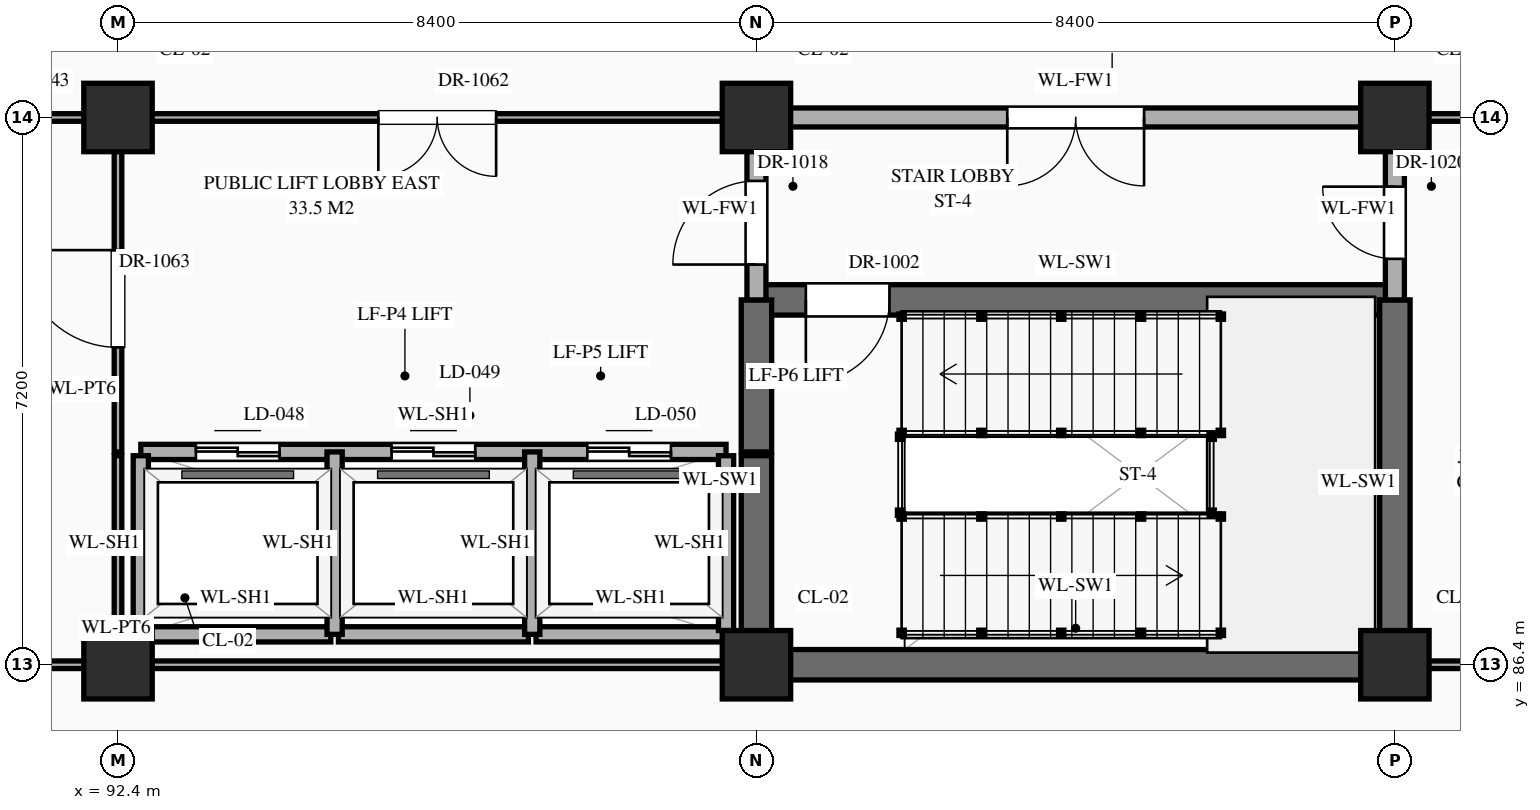
"""IFC4 building model, lengths in metres.
Left out: names, types, materials, properties, quantities, classifications, styles, units other than length and angle.
Written with IfcOpenShell. Run it as: python <this file> out.ifc"""

import sys

from ifc_helpers import new_model, si_unit, direction, frame, frame_2d, origin, origin_2d, place, context, subcontext, project, spatial, rectangle, extrude, element, fill, save


model = new_model("IFC4")
c1 = context("Model", 3, precision=1e-05, world=origin(), true_north=direction((0.0, 1.0)))
c2 = subcontext(c1, "Body", "Model", "MODEL_VIEW")
j1 = project(units=[si_unit("LENGTHUNIT", "METRE"), si_unit("PLANEANGLEUNIT", "RADIAN")], contexts=[c1])
p1 = place(None, origin())
s1 = spatial("IfcSite", under=j1, at=p1, CompositionType="ELEMENT")
p2 = place(p1, origin())
s2 = spatial("IfcBuilding", under=s1, at=p2, CompositionType="ELEMENT")
p3 = place(p2, frame((0.0, 0.0, 5.4)))
s3 = spatial("IfcBuildingStorey", under=s2, at=p3, CompositionType="ELEMENT", Elevation=5.4)
for number, where, z_axis, x_axis in (
    (1, (92.4, 86.4, 0.0), (0.0, 0.0, 1.0), (1.0, 0.0, 0.0)),
    (2, (92.4, 93.6, 0.0), (0.0, 0.0, 1.0), (1.0, 0.0, 0.0)),
    (3, (100.8, 86.4, 0.0), (0.0, 0.0, 1.0), (1.0, 0.0, 0.0)),
    (4, (100.8, 93.6, 0.0), (0.0, 0.0, 1.0), (1.0, 0.0, 0.0)),
    (5, (109.2, 86.4, 0.0), (0.0, 0.0, 1.0), (1.0, 0.0, 0.0)),
    (6, (109.2, 93.6, 0.0), (0.0, 0.0, 1.0), (1.0, 0.0, 0.0)),
):
    element("IfcColumn", number, at=place(p3, frame(where, z_axis=z_axis, x_axis=x_axis)), inside=s3, PredefinedType="COLUMN", context=c2, shape_type="SweptSolid", body=[
        extrude(rectangle(XDim=0.9, YDim=0.9, at=origin_2d()), origin(), (0.0, 0.0, 1.0), 5.4),
    ])
p4 = place(p3, frame((84.0, 86.4, 0.0), z_axis=(0.0, 0.0, 1.0), x_axis=(1.0, 0.0, 0.0)))
e7 = element("IfcWall", 7, at=p4, inside=s3, PredefinedType="STANDARD", context=c2, shape_type="SweptSolid", body=[
    extrude(rectangle(XDim=8.4, YDim=0.1, at=frame_2d((4.2, 0.0))), origin(), (0.0, 0.0, 1.0), 4.27),
])
p5 = place(p4, frame((1.025, 0.0, 0.0)))
e8 = element("IfcOpeningElement", 8, at=p5, cuts=e7, PredefinedType="OPENING", context=c2, shape_type="SweptSolid", body=[
    extrude(rectangle(XDim=1.12, YDim=2.25, at=frame_2d((0.56, 1.125))), frame((0.0, 0.062, 0.0), z_axis=(0.0, -1.0, 0.0), x_axis=(1.0, 0.0, 0.0)), (0.0, 0.0, 1.0), 0.124),
])
p6 = place(p4, frame((3.6, 0.0, 0.0)))
e9 = element("IfcOpeningElement", 9, at=p6, cuts=e7, PredefinedType="OPENING", context=c2, shape_type="SweptSolid", body=[
    extrude(rectangle(XDim=1.2, YDim=2.35, at=frame_2d((0.6, 1.175))), frame((0.0, 0.062, 0.0), z_axis=(0.0, -1.0, 0.0), x_axis=(1.0, 0.0, 0.0)), (0.0, 0.0, 1.0), 0.124),
])
p7 = place(p4, frame((6.195, 0.0, 0.0)))
e10 = element("IfcOpeningElement", 10, at=p7, cuts=e7, PredefinedType="OPENING", context=c2, shape_type="SweptSolid", body=[
    extrude(rectangle(XDim=1.24, YDim=2.3, at=frame_2d((0.62, 1.15))), frame((0.0, 0.062, 0.0), z_axis=(0.0, -1.0, 0.0), x_axis=(1.0, 0.0, 0.0)), (0.0, 0.0, 1.0), 0.124),
])
p8 = place(p3, frame((92.45, 86.4, 0.0), z_axis=(0.0, 0.0, 1.0), x_axis=(1.0, 0.0, 0.0)))
e11 = element("IfcWall", 11, at=p8, inside=s3, PredefinedType="STANDARD", context=c2, shape_type="SweptSolid", body=[
    extrude(rectangle(XDim=8.3, YDim=0.1, at=frame_2d((4.15, 0.0))), origin(), (0.0, 0.0, 1.0), 4.27),
])
p9 = place(p3, frame((100.8, 86.4, 0.0), z_axis=(0.0, 0.0, 1.0), x_axis=(1.0, 0.0, 0.0)))
e12 = element("IfcWall", 12, at=p9, inside=s3, PredefinedType="SHEAR", context=c2, shape_type="SweptSolid", body=[
    extrude(rectangle(XDim=8.4, YDim=0.4, at=frame_2d((4.2, 0.0))), origin(), (0.0, 0.0, 1.0), 5.12),
])
p10 = place(p3, frame((109.2, 86.4, 0.0), z_axis=(0.0, 0.0, 1.0), x_axis=(1.0, 0.0, 0.0)))
e13 = element("IfcWall", 13, at=p10, inside=s3, PredefinedType="STANDARD", context=c2, shape_type="SweptSolid", body=[
    extrude(rectangle(XDim=8.4, YDim=0.1, at=frame_2d((4.2, 0.0))), origin(), (0.0, 0.0, 1.0), 4.27),
])
p11 = place(p10, frame((1.115, 0.0, 0.0)))
e14 = element("IfcOpeningElement", 14, at=p11, cuts=e13, PredefinedType="OPENING", context=c2, shape_type="SweptSolid", body=[
    extrude(rectangle(XDim=0.94, YDim=2.3, at=frame_2d((0.47, 1.15))), frame((0.0, 0.062, 0.0), z_axis=(0.0, -1.0, 0.0), x_axis=(1.0, 0.0, 0.0)), (0.0, 0.0, 1.0), 0.124),
])
p12 = place(p10, frame((3.69, 0.0, 0.0)))
e15 = element("IfcOpeningElement", 15, at=p12, cuts=e13, PredefinedType="OPENING", context=c2, shape_type="SweptSolid", body=[
    extrude(rectangle(XDim=1.02, YDim=2.4, at=frame_2d((0.51, 1.2))), frame((0.0, 0.062, 0.0), z_axis=(0.0, -1.0, 0.0), x_axis=(1.0, 0.0, 0.0)), (0.0, 0.0, 1.0), 0.124),
])
p13 = place(p10, frame((6.285, 0.0, 0.0)))
e16 = element("IfcOpeningElement", 16, at=p13, cuts=e13, PredefinedType="OPENING", context=c2, shape_type="SweptSolid", body=[
    extrude(rectangle(XDim=1.06, YDim=2.4, at=frame_2d((0.53, 1.2))), frame((0.0, 0.062, 0.0), z_axis=(0.0, -1.0, 0.0), x_axis=(1.0, 0.0, 0.0)), (0.0, 0.0, 1.0), 0.124),
])
for number, where, z_axis, x_axis in (
    (17, (92.7, 86.8, 0.0), (0.0, 0.0, 1.0), (1.0, 0.0, 0.0)),
    (18, (95.3, 86.8, 0.0), (0.0, 0.0, 1.0), (1.0, 0.0, 0.0)),
    (19, (97.9, 86.8, 0.0), (0.0, 0.0, 1.0), (1.0, 0.0, 0.0)),
):
    element("IfcWall", number, at=place(p3, frame(where, z_axis=z_axis, x_axis=x_axis)), inside=s3, PredefinedType="STANDARD", context=c2, shape_type="SweptSolid", body=[
        extrude(rectangle(XDim=2.5, YDim=0.2, at=frame_2d((1.25, 0.0))), origin(), (0.0, 0.0, 1.0), 5.12),
    ])
p14 = place(p3, frame((92.7, 89.2, 0.0), z_axis=(0.0, 0.0, 1.0), x_axis=(1.0, 0.0, 0.0)))
e20 = element("IfcWall", 20, at=p14, inside=s3, PredefinedType="STANDARD", context=c2, shape_type="SweptSolid", body=[
    extrude(rectangle(XDim=7.7, YDim=0.2, at=frame_2d((3.85, 0.0))), origin(), (0.0, 0.0, 1.0), 5.12),
])
p15 = place(p14, frame((0.725, 0.0, 0.0)))
e21 = element("IfcOpeningElement", 21, at=p15, cuts=e20, PredefinedType="OPENING", context=c2, shape_type="SweptSolid", body=[
    extrude(rectangle(XDim=1.1, YDim=2.15, at=frame_2d((0.55, 1.075))), frame((0.0, 0.112, 0.0), z_axis=(0.0, -1.0, 0.0), x_axis=(1.0, 0.0, 0.0)), (0.0, 0.0, 1.0), 0.224),
])
p16 = place(p14, frame((3.3, 0.0, 0.0)))
e22 = element("IfcOpeningElement", 22, at=p16, cuts=e20, PredefinedType="OPENING", context=c2, shape_type="SweptSolid", body=[
    extrude(rectangle(XDim=1.1, YDim=2.15, at=frame_2d((0.55, 1.075))), frame((0.0, 0.112, 0.0), z_axis=(0.0, -1.0, 0.0), x_axis=(1.0, 0.0, 0.0)), (0.0, 0.0, 1.0), 0.224),
])
p17 = place(p14, frame((5.875, 0.0, 0.0)))
e23 = element("IfcOpeningElement", 23, at=p17, cuts=e20, PredefinedType="OPENING", context=c2, shape_type="SweptSolid", body=[
    extrude(rectangle(XDim=1.1, YDim=2.15, at=frame_2d((0.55, 1.075))), frame((0.0, 0.112, 0.0), z_axis=(0.0, -1.0, 0.0), x_axis=(1.0, 0.0, 0.0)), (0.0, 0.0, 1.0), 0.224),
])
p18 = place(p3, frame((100.8, 91.2, 0.0), z_axis=(0.0, 0.0, 1.0), x_axis=(1.0, 0.0, 0.0)))
e24 = element("IfcWall", 24, at=p18, inside=s3, PredefinedType="SHEAR", context=c2, shape_type="SweptSolid", body=[
    extrude(rectangle(XDim=8.4, YDim=0.4, at=frame_2d((4.2, 0.0))), origin(), (0.0, 0.0, 1.0), 5.12),
])
p19 = place(p18, frame((0.65, 0.0, 0.0)))
e25 = element("IfcOpeningElement", 25, at=p19, cuts=e24, PredefinedType="OPENING", context=c2, shape_type="SweptSolid", body=[
    extrude(rectangle(XDim=1.1, YDim=2.2, at=frame_2d((0.55, 1.1))), frame((0.0, 0.212, 0.0), z_axis=(0.0, -1.0, 0.0), x_axis=(1.0, 0.0, 0.0)), (0.0, 0.0, 1.0), 0.424),
])
p20 = place(p3, frame((67.2, 93.6, 0.0), z_axis=(0.0, 0.0, 1.0), x_axis=(1.0, 0.0, 0.0)))
e26 = element("IfcWall", 26, at=p20, inside=s3, PredefinedType="STANDARD", context=c2, shape_type="SweptSolid", body=[
    extrude(rectangle(XDim=33.6, YDim=0.1, at=frame_2d((16.8, 0.0))), origin(), (0.0, 0.0, 1.0), 4.27),
])
p21 = place(p20, frame((3.375, 0.0, 0.0)))
e27 = element("IfcOpeningElement", 27, at=p21, cuts=e26, PredefinedType="OPENING", context=c2, shape_type="SweptSolid", body=[
    extrude(rectangle(XDim=1.65, YDim=2.4, at=frame_2d((0.825, 1.2))), frame((0.0, 0.062, 0.0), z_axis=(0.0, -1.0, 0.0), x_axis=(1.0, 0.0, 0.0)), (0.0, 0.0, 1.0), 0.124),
])
p22 = place(p20, frame((28.625, 0.0, 0.0)))
e28 = element("IfcOpeningElement", 28, at=p22, cuts=e26, PredefinedType="OPENING", context=c2, shape_type="SweptSolid", body=[
    extrude(rectangle(XDim=1.55, YDim=2.35, at=frame_2d((0.775, 1.175))), frame((0.0, 0.062, 0.0), z_axis=(0.0, -1.0, 0.0), x_axis=(1.0, 0.0, 0.0)), (0.0, 0.0, 1.0), 0.124),
])
p23 = place(p20, frame((11.65, 0.0, 0.0)))
e29 = element("IfcOpeningElement", 29, at=p23, cuts=e26, PredefinedType="OPENING", context=c2, shape_type="SweptSolid", body=[
    extrude(rectangle(XDim=1.9, YDim=2.5, at=frame_2d((0.95, 1.25))), frame((0.0, 0.062, 0.0), z_axis=(0.0, -1.0, 0.0), x_axis=(1.0, 0.0, 0.0)), (0.0, 0.0, 1.0), 0.124),
])
p24 = place(p20, frame((17.885, 0.0, 0.0)))
e30 = element("IfcOpeningElement", 30, at=p24, cuts=e26, PredefinedType="OPENING", context=c2, shape_type="SweptSolid", body=[
    extrude(rectangle(XDim=1.0, YDim=2.25, at=frame_2d((0.5, 1.125))), frame((0.0, 0.062, 0.0), z_axis=(0.0, -1.0, 0.0), x_axis=(1.0, 0.0, 0.0)), (0.0, 0.0, 1.0), 0.124),
])
p25 = place(p20, frame((20.48, 0.0, 0.0)))
e31 = element("IfcOpeningElement", 31, at=p25, cuts=e26, PredefinedType="OPENING", context=c2, shape_type="SweptSolid", body=[
    extrude(rectangle(XDim=1.04, YDim=2.2, at=frame_2d((0.52, 1.1))), frame((0.0, 0.062, 0.0), z_axis=(0.0, -1.0, 0.0), x_axis=(1.0, 0.0, 0.0)), (0.0, 0.0, 1.0), 0.124),
])
p26 = place(p20, frame((23.075, 0.0, 0.0)))
e32 = element("IfcOpeningElement", 32, at=p26, cuts=e26, PredefinedType="OPENING", context=c2, shape_type="SweptSolid", body=[
    extrude(rectangle(XDim=1.08, YDim=2.25, at=frame_2d((0.54, 1.125))), frame((0.0, 0.062, 0.0), z_axis=(0.0, -1.0, 0.0), x_axis=(1.0, 0.0, 0.0)), (0.0, 0.0, 1.0), 0.124),
])
p27 = place(p3, frame((100.8, 93.6, 0.0), z_axis=(0.0, 0.0, 1.0), x_axis=(1.0, 0.0, 0.0)))
e33 = element("IfcWall", 33, at=p27, inside=s3, PredefinedType="STANDARD", context=c2, shape_type="SweptSolid", body=[
    extrude(rectangle(XDim=8.4, YDim=0.25, at=frame_2d((4.2, 0.0))), origin(), (0.0, 0.0, 1.0), 4.27),
])
p28 = place(p27, frame((3.3, 0.0, 0.0)))
e34 = element("IfcOpeningElement", 34, at=p28, cuts=e33, PredefinedType="OPENING", context=c2, shape_type="SweptSolid", body=[
    extrude(rectangle(XDim=1.8, YDim=2.35, at=frame_2d((0.9, 1.175))), frame((0.0, 0.137, 0.0), z_axis=(0.0, -1.0, 0.0), x_axis=(1.0, 0.0, 0.0)), (0.0, 0.0, 1.0), 0.274),
])
p29 = place(p3, frame((109.2, 93.6, 0.0), z_axis=(0.0, 0.0, 1.0), x_axis=(1.0, 0.0, 0.0)))
e35 = element("IfcWall", 35, at=p29, inside=s3, PredefinedType="STANDARD", context=c2, shape_type="SweptSolid", body=[
    extrude(rectangle(XDim=8.4, YDim=0.1, at=frame_2d((4.2, 0.0))), origin(), (0.0, 0.0, 1.0), 4.27),
])
p30 = place(p29, frame((1.025, 0.0, 0.0)))
e36 = element("IfcOpeningElement", 36, at=p30, cuts=e35, PredefinedType="OPENING", context=c2, shape_type="SweptSolid", body=[
    extrude(rectangle(XDim=1.12, YDim=2.25, at=frame_2d((0.56, 1.125))), frame((0.0, 0.062, 0.0), z_axis=(0.0, -1.0, 0.0), x_axis=(1.0, 0.0, 0.0)), (0.0, 0.0, 1.0), 0.124),
])
p31 = place(p29, frame((3.62, 0.0, 0.0)))
e37 = element("IfcOpeningElement", 37, at=p31, cuts=e35, PredefinedType="OPENING", context=c2, shape_type="SweptSolid", body=[
    extrude(rectangle(XDim=1.16, YDim=2.3, at=frame_2d((0.58, 1.15))), frame((0.0, 0.062, 0.0), z_axis=(0.0, -1.0, 0.0), x_axis=(1.0, 0.0, 0.0)), (0.0, 0.0, 1.0), 0.124),
])
p32 = place(p29, frame((6.215, 0.0, 0.0)))
e38 = element("IfcOpeningElement", 38, at=p32, cuts=e35, PredefinedType="OPENING", context=c2, shape_type="SweptSolid", body=[
    extrude(rectangle(XDim=1.2, YDim=2.35, at=frame_2d((0.6, 1.175))), frame((0.0, 0.062, 0.0), z_axis=(0.0, -1.0, 0.0), x_axis=(1.0, 0.0, 0.0)), (0.0, 0.0, 1.0), 0.124),
])
p33 = place(p3, frame((92.4, 86.45, 0.0), z_axis=(0.0, 0.0, 1.0), x_axis=(0.0, 1.0, 0.0)))
e39 = element("IfcWall", 39, at=p33, inside=s3, PredefinedType="STANDARD", context=c2, shape_type="SweptSolid", body=[
    extrude(rectangle(XDim=2.7, YDim=0.1, at=frame_2d((1.35, 0.0))), origin(), (0.0, 0.0, 1.0), 4.37),
])
p34 = place(p3, frame((92.4, 89.2, 0.0), z_axis=(0.0, 0.0, 1.0), x_axis=(0.0, 1.0, 0.0)))
e40 = element("IfcWall", 40, at=p34, inside=s3, PredefinedType="STANDARD", context=c2, shape_type="SweptSolid", body=[
    extrude(rectangle(XDim=4.4, YDim=0.1, at=frame_2d((2.2, 0.0))), origin(), (0.0, 0.0, 1.0), 4.37),
])
p35 = place(p34, frame((1.375, 0.0, 0.0)))
e41 = element("IfcOpeningElement", 41, at=p35, cuts=e40, PredefinedType="OPENING", context=c2, shape_type="SweptSolid", body=[
    extrude(rectangle(XDim=1.28, YDim=2.35, at=frame_2d((0.64, 1.175))), frame((0.0, 0.062, 0.0), z_axis=(0.0, -1.0, 0.0), x_axis=(1.0, 0.0, 0.0)), (0.0, 0.0, 1.0), 0.124),
])
p36 = place(p3, frame((92.7, 86.85, 0.0), z_axis=(0.0, 0.0, 1.0), x_axis=(0.0, 1.0, 0.0)))
e42 = element("IfcWall", 42, at=p36, inside=s3, PredefinedType="STANDARD", context=c2, shape_type="SweptSolid", body=[
    extrude(rectangle(XDim=2.3, YDim=0.2, at=frame_2d((1.15, 0.0))), origin(), (0.0, 0.0, 1.0), 5.12),
])
for number, where, z_axis, x_axis in (
    (43, (95.25, 86.8, 0.0), (0.0, 0.0, 1.0), (0.0, 1.0, 0.0)),
    (44, (97.85, 86.8, 0.0), (0.0, 0.0, 1.0), (0.0, 1.0, 0.0)),
):
    element("IfcWall", number, at=place(p3, frame(where, z_axis=z_axis, x_axis=x_axis)), inside=s3, PredefinedType="STANDARD", context=c2, shape_type="SweptSolid", body=[
        extrude(rectangle(XDim=2.4, YDim=0.2, at=frame_2d((1.2, 0.0))), origin(), (0.0, 0.0, 1.0), 5.12),
    ])
p37 = place(p3, frame((100.4, 86.85, 0.0), z_axis=(0.0, 0.0, 1.0), x_axis=(0.0, 1.0, 0.0)))
e45 = element("IfcWall", 45, at=p37, inside=s3, PredefinedType="STANDARD", context=c2, shape_type="SweptSolid", body=[
    extrude(rectangle(XDim=2.3, YDim=0.2, at=frame_2d((1.15, 0.0))), origin(), (0.0, 0.0, 1.0), 5.12),
])
p38 = place(p3, frame((100.8, 86.45, 0.0), z_axis=(0.0, 0.0, 1.0), x_axis=(0.0, 1.0, 0.0)))
e46 = element("IfcWall", 46, at=p38, inside=s3, PredefinedType="SHEAR", context=c2, shape_type="SweptSolid", body=[
    extrude(rectangle(XDim=2.7, YDim=0.4, at=frame_2d((1.35, 0.0))), origin(), (0.0, 0.0, 1.0), 5.12),
])
p39 = place(p3, frame((100.8, 89.2, 0.0), z_axis=(0.0, 0.0, 1.0), x_axis=(0.0, 1.0, 0.0)))
e47 = element("IfcWall", 47, at=p39, inside=s3, PredefinedType="SHEAR", context=c2, shape_type="SweptSolid", body=[
    extrude(rectangle(XDim=2.0, YDim=0.4, at=frame_2d((1.0, 0.0))), origin(), (0.0, 0.0, 1.0), 5.12),
])
p40 = place(p3, frame((100.8, 91.2, 0.0), z_axis=(0.0, 0.0, 1.0), x_axis=(0.0, 1.0, 0.0)))
e48 = element("IfcWall", 48, at=p40, inside=s3, PredefinedType="STANDARD", context=c2, shape_type="SweptSolid", body=[
    extrude(rectangle(XDim=2.4, YDim=0.25, at=frame_2d((1.2, 0.0))), origin(), (0.0, 0.0, 1.0), 4.37),
])
p41 = place(p40, frame((0.465, 0.0, 0.0)))
e49 = element("IfcOpeningElement", 49, at=p41, cuts=e48, PredefinedType="OPENING", context=c2, shape_type="SweptSolid", body=[
    extrude(rectangle(XDim=1.1, YDim=2.2, at=frame_2d((0.55, 1.1))), frame((0.0, 0.137, 0.0), z_axis=(0.0, -1.0, 0.0), x_axis=(1.0, 0.0, 0.0)), (0.0, 0.0, 1.0), 0.274),
])
p42 = place(p3, frame((109.2, 86.4, 0.0), z_axis=(0.0, 0.0, 1.0), x_axis=(0.0, 1.0, 0.0)))
e50 = element("IfcWall", 50, at=p42, inside=s3, PredefinedType="SHEAR", context=c2, shape_type="SweptSolid", body=[
    extrude(rectangle(XDim=4.8, YDim=0.4, at=frame_2d((2.4, 0.0))), origin(), (0.0, 0.0, 1.0), 5.12),
])
p43 = place(p3, frame((109.2, 91.2, 0.0), z_axis=(0.0, 0.0, 1.0), x_axis=(0.0, 1.0, 0.0)))
e51 = element("IfcWall", 51, at=p43, inside=s3, PredefinedType="STANDARD", context=c2, shape_type="SweptSolid", body=[
    extrude(rectangle(XDim=2.4, YDim=0.25, at=frame_2d((1.2, 0.0))), origin(), (0.0, 0.0, 1.0), 4.37),
])
p44 = place(p43, frame((0.54, 0.0, 0.0)))
e52 = element("IfcOpeningElement", 52, at=p44, cuts=e51, PredefinedType="OPENING", context=c2, shape_type="SweptSolid", body=[
    extrude(rectangle(XDim=0.95, YDim=2.15, at=frame_2d((0.475, 1.075))), frame((0.0, 0.137, 0.0), z_axis=(0.0, -1.0, 0.0), x_axis=(1.0, 0.0, 0.0)), (0.0, 0.0, 1.0), 0.274),
])
p45 = place(p15, origin())
e53 = element("IfcDoor", 53, at=p45, inside=s3, OperationType="DOUBLE_DOOR_SLIDING", PredefinedType="DOOR", context=c2, shape_type="SweptSolid", body=[
    extrude(rectangle(XDim=1.1, YDim=2.15, at=frame_2d((0.55, 1.075))), frame((0.0, 0.025, 0.0), z_axis=(0.0, -1.0, 0.0), x_axis=(1.0, 0.0, 0.0)), (0.0, 0.0, 1.0), 0.05),
])
fill(e21, e53)
p46 = place(p16, origin())
e54 = element("IfcDoor", 54, at=p46, inside=s3, OperationType="DOUBLE_DOOR_SLIDING", PredefinedType="DOOR", context=c2, shape_type="SweptSolid", body=[
    extrude(rectangle(XDim=1.1, YDim=2.15, at=frame_2d((0.55, 1.075))), frame((0.0, 0.025, 0.0), z_axis=(0.0, -1.0, 0.0), x_axis=(1.0, 0.0, 0.0)), (0.0, 0.0, 1.0), 0.05),
])
fill(e22, e54)
p47 = place(p17, origin())
e55 = element("IfcDoor", 55, at=p47, inside=s3, OperationType="DOUBLE_DOOR_SLIDING", PredefinedType="DOOR", context=c2, shape_type="SweptSolid", body=[
    extrude(rectangle(XDim=1.1, YDim=2.15, at=frame_2d((0.55, 1.075))), frame((0.0, 0.025, 0.0), z_axis=(0.0, -1.0, 0.0), x_axis=(1.0, 0.0, 0.0)), (0.0, 0.0, 1.0), 0.05),
])
fill(e23, e55)
p48 = place(p19, frame((1.1, 0.0, 0.0), z_axis=(0.0, 0.0, 1.0), x_axis=(-1.0, 0.0, 0.0)))
e56 = element("IfcDoor", 56, at=p48, inside=s3, OperationType="SINGLE_SWING_RIGHT", PredefinedType="DOOR", context=c2, shape_type="SweptSolid", body=[
    extrude(rectangle(XDim=1.1, YDim=2.2, at=frame_2d((0.55, 1.1))), frame((0.0, 0.025, 0.0), z_axis=(0.0, -1.0, 0.0), x_axis=(1.0, 0.0, 0.0)), (0.0, 0.0, 1.0), 0.05),
])
fill(e25, e56)
p49 = place(p41, origin())
e57 = element("IfcDoor", 57, at=p49, inside=s3, OperationType="SINGLE_SWING_LEFT", PredefinedType="DOOR", context=c2, shape_type="SweptSolid", body=[
    extrude(rectangle(XDim=1.1, YDim=2.2, at=frame_2d((0.55, 1.1))), frame((0.0, 0.025, 0.0), z_axis=(0.0, -1.0, 0.0), x_axis=(1.0, 0.0, 0.0)), (0.0, 0.0, 1.0), 0.05),
])
fill(e49, e57)
p50 = place(p28, frame((1.8, 0.0, 0.0), z_axis=(0.0, 0.0, 1.0), x_axis=(-1.0, 0.0, 0.0)))
e58 = element("IfcDoor", 58, at=p50, inside=s3, OperationType="DOUBLE_DOOR_SINGLE_SWING", PredefinedType="DOOR", context=c2, shape_type="SweptSolid", body=[
    extrude(rectangle(XDim=1.8, YDim=2.35, at=frame_2d((0.9, 1.175))), frame((0.0, 0.025, 0.0), z_axis=(0.0, -1.0, 0.0), x_axis=(1.0, 0.0, 0.0)), (0.0, 0.0, 1.0), 0.05),
])
fill(e34, e58)
p51 = place(p44, origin())
e59 = element("IfcDoor", 59, at=p51, inside=s3, OperationType="SINGLE_SWING_RIGHT", PredefinedType="DOOR", context=c2, shape_type="SweptSolid", body=[
    extrude(rectangle(XDim=0.95, YDim=2.15, at=frame_2d((0.475, 1.075))), frame((0.0, 0.025, 0.0), z_axis=(0.0, -1.0, 0.0), x_axis=(1.0, 0.0, 0.0)), (0.0, 0.0, 1.0), 0.05),
])
fill(e52, e59)
p52 = place(p22, frame((1.55, 0.0, 0.0), z_axis=(0.0, 0.0, 1.0), x_axis=(-1.0, 0.0, 0.0)))
e60 = element("IfcDoor", 60, at=p52, inside=s3, OperationType="DOUBLE_DOOR_SINGLE_SWING", PredefinedType="DOOR", context=c2, shape_type="SweptSolid", body=[
    extrude(rectangle(XDim=1.55, YDim=2.35, at=frame_2d((0.775, 1.175))), frame((0.0, 0.025, 0.0), z_axis=(0.0, -1.0, 0.0), x_axis=(1.0, 0.0, 0.0)), (0.0, 0.0, 1.0), 0.05),
])
fill(e28, e60)
p53 = place(p35, origin())
e61 = element("IfcDoor", 61, at=p53, inside=s3, OperationType="SINGLE_SWING_RIGHT", PredefinedType="DOOR", context=c2, shape_type="SweptSolid", body=[
    extrude(rectangle(XDim=1.28, YDim=2.35, at=frame_2d((0.64, 1.175))), frame((0.0, 0.025, 0.0), z_axis=(0.0, -1.0, 0.0), x_axis=(1.0, 0.0, 0.0)), (0.0, 0.0, 1.0), 0.05),
])
fill(e41, e61)
save(model, sys.argv[1])
